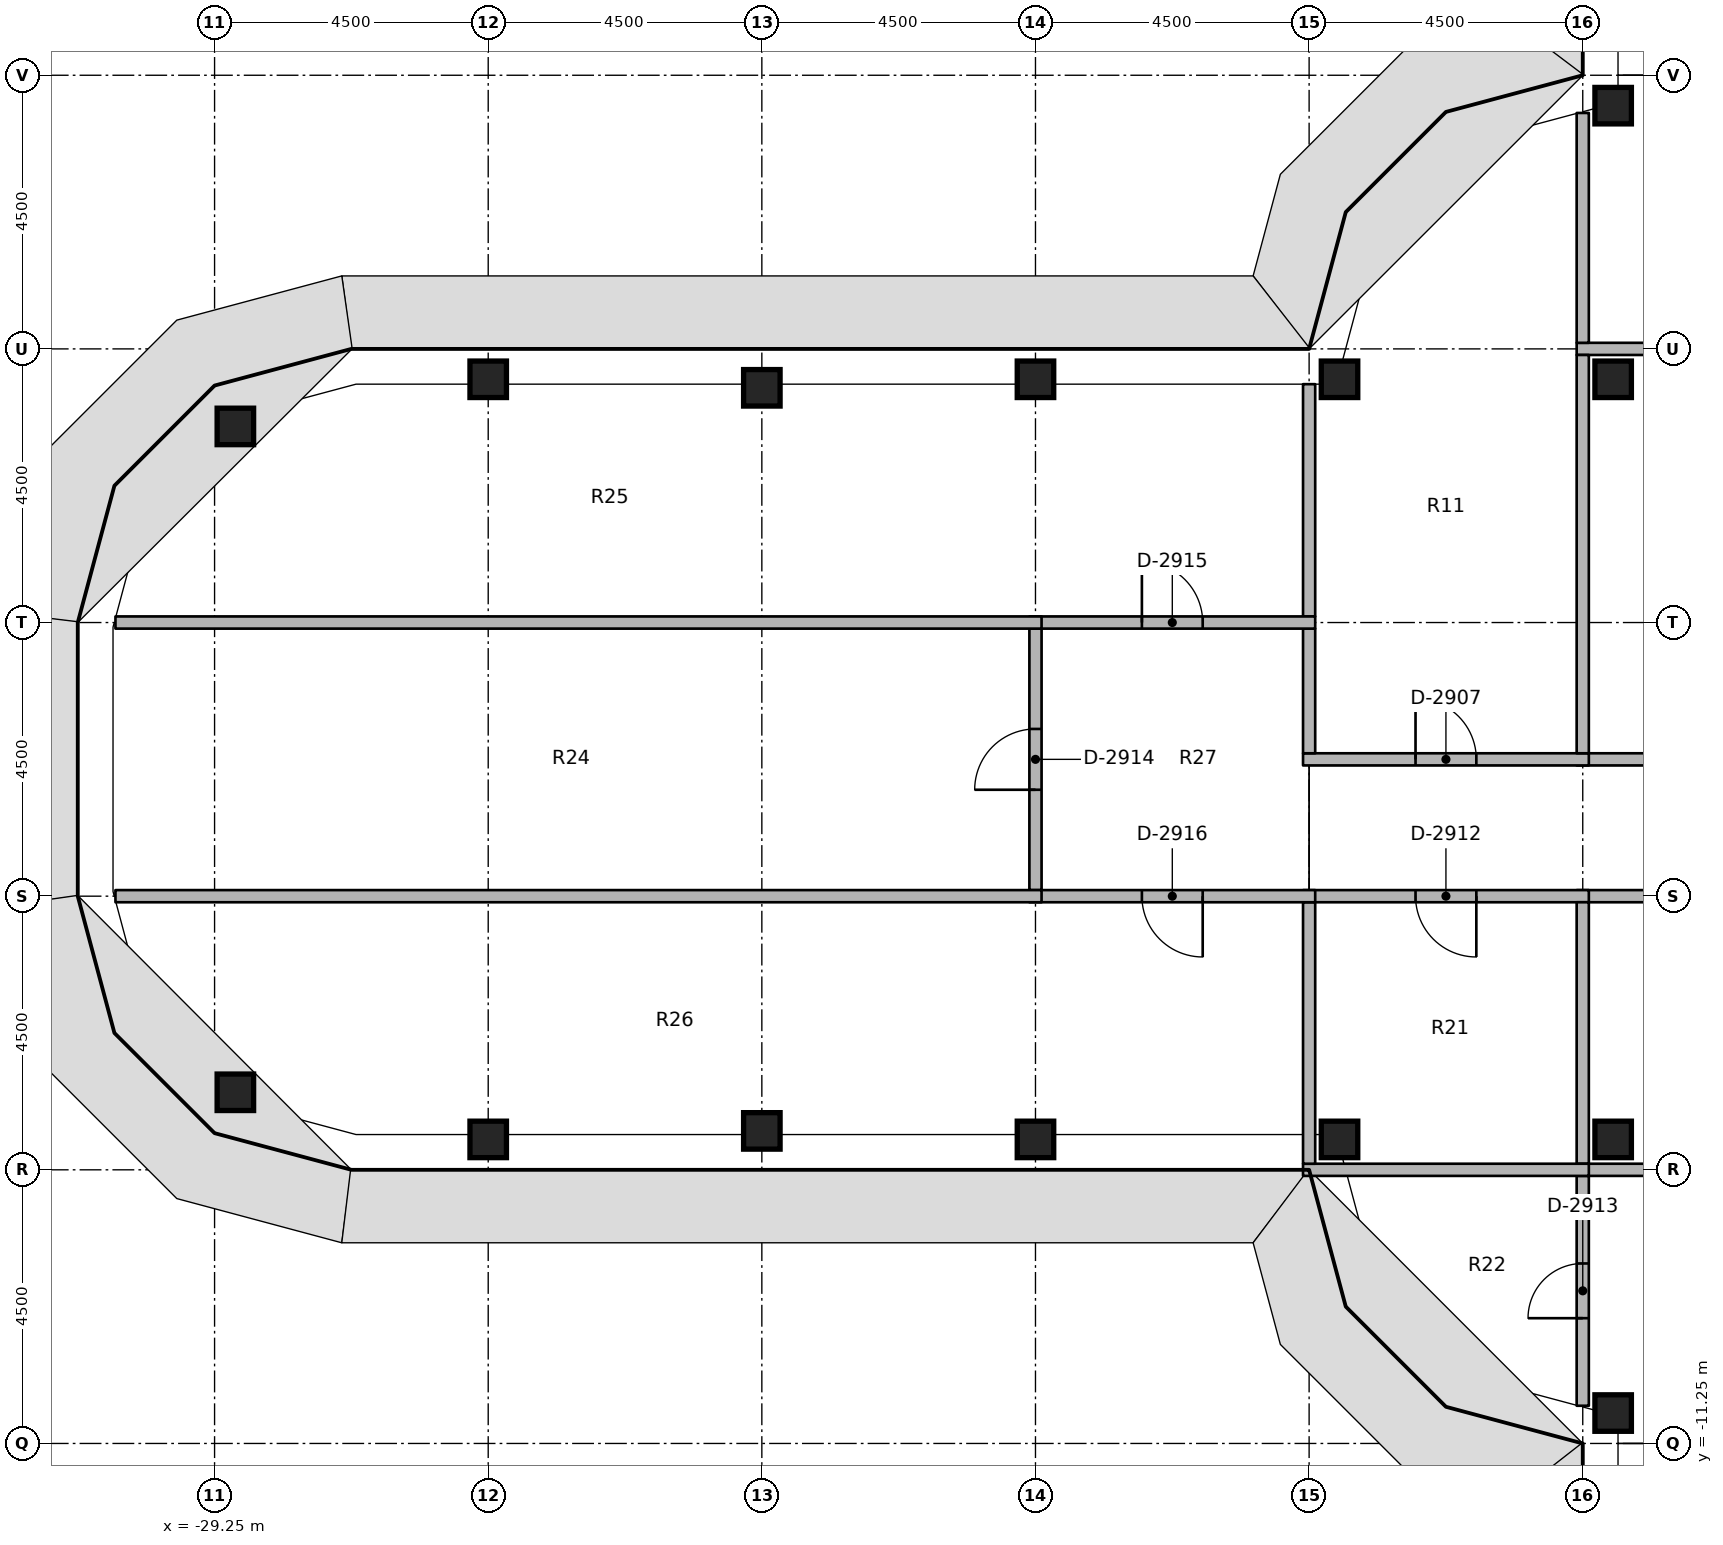
"""IFC4 building model, lengths in metres.
Left out: names, types, materials, properties, quantities, classifications, styles, units other than length and angle.
Written with IfcOpenShell. Run it as: python <this file> out.ifc"""

import sys

from ifc_helpers import new_model, si_unit, direction, frame, frame_2d, origin, origin_2d, place, context, subcontext, project, spatial, rectangle, extrude, element, fill, save


model = new_model("IFC4")
c1 = context("Model", 3, precision=1e-05, world=origin(), true_north=direction((0.0, 1.0)))
c2 = subcontext(c1, "Body", "Model", "MODEL_VIEW")
j1 = project(units=[si_unit("LENGTHUNIT", "METRE"), si_unit("PLANEANGLEUNIT", "RADIAN")], contexts=[c1])
p1 = place(None, origin())
s1 = spatial("IfcSite", under=j1, at=p1, CompositionType="ELEMENT")
p2 = place(p1, origin())
s2 = spatial("IfcBuilding", under=s1, at=p2, CompositionType="ELEMENT")
p3 = place(p2, frame((0.0, 0.0, 276.4)))
s3 = spatial("IfcBuildingStorey", under=s2, at=p3, CompositionType="ELEMENT", Elevation=276.4)
for number, where, z_axis, x_axis in (
    (1, (-28.908, -5.475, 0.0), (0.0, 0.0, 1.0), (1.0, 0.0, 0.0)),
    (2, (-28.908, 5.475, 0.0), (0.0, 0.0, 1.0), (1.0, 0.0, 0.0)),
    (3, (-24.75, -6.25, 0.0), (0.0, 0.0, 1.0), (1.0, 0.0, 0.0)),
    (4, (-24.75, 6.25, 0.0), (0.0, 0.0, 1.0), (1.0, 0.0, 0.0)),
    (5, (-20.25, -6.11, 0.0), (0.0, 0.0, 1.0), (1.0, 0.0, 0.0)),
    (6, (-20.25, 6.11, 0.0), (0.0, 0.0, 1.0), (1.0, 0.0, 0.0)),
    (7, (-15.75, -6.25, 0.0), (0.0, 0.0, 1.0), (1.0, 0.0, 0.0)),
    (8, (-15.75, 6.25, 0.0), (0.0, 0.0, 1.0), (1.0, 0.0, 0.0)),
    (9, (-10.75, -6.25, 0.0), (0.0, 0.0, 1.0), (1.0, 0.0, 0.0)),
    (10, (-10.75, 6.25, 0.0), (0.0, 0.0, 1.0), (1.0, 0.0, 0.0)),
    (11, (-6.25, -10.75, 0.0), (0.0, 0.0, 1.0), (1.0, 0.0, 0.0)),
    (12, (-6.25, -6.25, 0.0), (0.0, 0.0, 1.0), (1.0, 0.0, 0.0)),
    (13, (-6.25, 6.25, 0.0), (0.0, 0.0, 1.0), (1.0, 0.0, 0.0)),
    (14, (-6.25, 10.75, 0.0), (0.0, 0.0, 1.0), (1.0, 0.0, 0.0)),
):
    element("IfcColumn", number, at=place(p3, frame(where, z_axis=z_axis, x_axis=x_axis)), inside=s3, PredefinedType="COLUMN", context=c2, shape_type="SweptSolid", body=[
        extrude(rectangle(XDim=0.6, YDim=0.6, at=origin_2d()), origin(), (0.0, 0.0, 1.0), 3.65),
    ])
p4 = place(p3, frame((-6.85, 0.0, 0.0), z_axis=(0.0, 0.0, 1.0), x_axis=(1.0, 0.0, 0.0)))
e15 = element("IfcWall", 15, at=p4, inside=s3, PredefinedType="PARTITIONING", context=c2, shape_type="SweptSolid", body=[
    extrude(rectangle(XDim=5.825, YDim=0.2, at=frame_2d((2.913, 0.0))), origin(), (0.0, 0.0, 1.0), 2.75),
])
p5 = place(p4, frame((2.413, 0.0, 0.0)))
e16 = element("IfcOpeningElement", 16, at=p5, cuts=e15, PredefinedType="OPENING", context=c2, shape_type="SweptSolid", body=[
    extrude(rectangle(XDim=1.0, YDim=2.1, at=frame_2d((0.5, 1.05))), frame((0.0, 0.11, 0.0), z_axis=(0.0, -1.0, 0.0), x_axis=(1.0, 0.0, 0.0)), (0.0, 0.0, 1.0), 0.22),
])
p6 = place(p3, frame((-11.35, 0.0, 0.0), z_axis=(0.0, 0.0, 1.0), x_axis=(1.0, 0.0, 0.0)))
e17 = element("IfcWall", 17, at=p6, inside=s3, PredefinedType="PARTITIONING", context=c2, shape_type="SweptSolid", body=[
    extrude(rectangle(XDim=4.7, YDim=0.2, at=frame_2d((2.35, 0.0))), origin(), (0.0, 0.0, 1.0), 2.75),
])
p7 = place(p6, frame((1.85, 0.0, 0.0)))
e18 = element("IfcOpeningElement", 18, at=p7, cuts=e17, PredefinedType="OPENING", context=c2, shape_type="SweptSolid", body=[
    extrude(rectangle(XDim=1.0, YDim=2.1, at=frame_2d((0.5, 1.05))), frame((0.0, 0.11, 0.0), z_axis=(0.0, -1.0, 0.0), x_axis=(1.0, 0.0, 0.0)), (0.0, 0.0, 1.0), 0.22),
])
p8 = place(p3, frame((-1.025, -2.25, 0.0), z_axis=(0.0, 0.0, 1.0), x_axis=(-1.0, 0.0, 0.0)))
e19 = element("IfcWall", 19, at=p8, inside=s3, PredefinedType="PARTITIONING", context=c2, shape_type="SweptSolid", body=[
    extrude(rectangle(XDim=5.825, YDim=0.2, at=frame_2d((2.913, 0.0))), origin(), (0.0, 0.0, 1.0), 2.75),
])
p9 = place(p8, frame((2.413, 0.0, 0.0)))
e20 = element("IfcOpeningElement", 20, at=p9, cuts=e19, PredefinedType="OPENING", context=c2, shape_type="SweptSolid", body=[
    extrude(rectangle(XDim=1.0, YDim=2.1, at=frame_2d((0.5, 1.05))), frame((0.0, 0.11, 0.0), z_axis=(0.0, -1.0, 0.0), x_axis=(1.0, 0.0, 0.0)), (0.0, 0.0, 1.0), 0.22),
])
p10 = place(p3, frame((-6.65, -2.25, 0.0), z_axis=(0.0, 0.0, 1.0), x_axis=(-1.0, 0.0, 0.0)))
e21 = element("IfcWall", 21, at=p10, inside=s3, PredefinedType="PARTITIONING", context=c2, shape_type="SweptSolid", body=[
    extrude(rectangle(XDim=4.7, YDim=0.2, at=frame_2d((2.35, 0.0))), origin(), (0.0, 0.0, 1.0), 2.75),
])
p11 = place(p10, frame((1.85, 0.0, 0.0)))
e22 = element("IfcOpeningElement", 22, at=p11, cuts=e21, PredefinedType="OPENING", context=c2, shape_type="SweptSolid", body=[
    extrude(rectangle(XDim=1.0, YDim=2.1, at=frame_2d((0.5, 1.05))), frame((0.0, 0.11, 0.0), z_axis=(0.0, -1.0, 0.0), x_axis=(1.0, 0.0, 0.0)), (0.0, 0.0, 1.0), 0.22),
])
p12 = place(p3, frame((-6.85, 6.75, 0.0), z_axis=(0.0, 0.0, 1.0), x_axis=(1.0, 0.0, 0.0)))
e23 = element("IfcWall", 23, at=p12, inside=s3, PredefinedType="PARTITIONING", context=c2, shape_type="SweptSolid", body=[
    extrude(rectangle(XDim=5.825, YDim=0.2, at=frame_2d((2.913, 0.0))), origin(), (0.0, 0.0, 1.0), 2.75),
])
p13 = place(p3, frame((-6.75, 6.85, 0.0), z_axis=(0.0, 0.0, 1.0), x_axis=(0.0, 1.0, 0.0)))
e24 = element("IfcWall", 24, at=p13, inside=s3, PredefinedType="PARTITIONING", context=c2, shape_type="SweptSolid", body=[
    extrude(rectangle(XDim=3.78, YDim=0.2, at=frame_2d((1.89, 0.0))), origin(), (0.0, 0.0, 1.0), 2.75),
])
p14 = place(p3, frame((-6.85, -6.75, 0.0), z_axis=(0.0, 0.0, 1.0), x_axis=(1.0, 0.0, 0.0)))
e25 = element("IfcWall", 25, at=p14, inside=s3, PredefinedType="PARTITIONING", context=c2, shape_type="SweptSolid", body=[
    extrude(rectangle(XDim=5.825, YDim=0.2, at=frame_2d((2.913, 0.0))), origin(), (0.0, 0.0, 1.0), 2.75),
])
p15 = place(p3, frame((-6.75, -10.63, 0.0), z_axis=(0.0, 0.0, 1.0), x_axis=(0.0, 1.0, 0.0)))
e26 = element("IfcWall", 26, at=p15, inside=s3, PredefinedType="PARTITIONING", context=c2, shape_type="SweptSolid", body=[
    extrude(rectangle(XDim=3.78, YDim=0.2, at=frame_2d((1.89, 0.0))), origin(), (0.0, 0.0, 1.0), 2.75),
])
p16 = place(p15, frame((1.44, 0.0, 0.0)))
e27 = element("IfcOpeningElement", 27, at=p16, cuts=e26, PredefinedType="OPENING", context=c2, shape_type="SweptSolid", body=[
    extrude(rectangle(XDim=0.9, YDim=2.1, at=frame_2d((0.45, 1.05))), frame((0.0, 0.11, 0.0), z_axis=(0.0, -1.0, 0.0), x_axis=(1.0, 0.0, 0.0)), (0.0, 0.0, 1.0), 0.22),
])
p17 = place(p3, frame((-6.75, 0.1, 0.0), z_axis=(0.0, 0.0, 1.0), x_axis=(0.0, 1.0, 0.0)))
e28 = element("IfcWall", 28, at=p17, inside=s3, PredefinedType="PARTITIONING", context=c2, shape_type="SweptSolid", body=[
    extrude(rectangle(XDim=6.55, YDim=0.2, at=frame_2d((3.275, 0.0))), origin(), (0.0, 0.0, 1.0), 2.75),
])
p18 = place(p3, frame((-11.25, 0.1, 0.0), z_axis=(0.0, 0.0, 1.0), x_axis=(0.0, 1.0, 0.0)))
e29 = element("IfcWall", 29, at=p18, inside=s3, PredefinedType="PARTITIONING", context=c2, shape_type="SweptSolid", body=[
    extrude(rectangle(XDim=2.05, YDim=0.2, at=frame_2d((1.025, 0.0))), origin(), (0.0, 0.0, 1.0), 2.75),
])
p19 = place(p3, frame((-11.25, 2.35, 0.0), z_axis=(0.0, 0.0, 1.0), x_axis=(0.0, 1.0, 0.0)))
e30 = element("IfcWall", 30, at=p19, inside=s3, PredefinedType="PARTITIONING", context=c2, shape_type="SweptSolid", body=[
    extrude(rectangle(XDim=3.82, YDim=0.2, at=frame_2d((1.91, 0.0))), origin(), (0.0, 0.0, 1.0), 2.75),
])
p20 = place(p3, frame((-6.75, -6.65, 0.0), z_axis=(0.0, 0.0, 1.0), x_axis=(0.0, 1.0, 0.0)))
e31 = element("IfcWall", 31, at=p20, inside=s3, PredefinedType="PARTITIONING", context=c2, shape_type="SweptSolid", body=[
    extrude(rectangle(XDim=4.3, YDim=0.2, at=frame_2d((2.15, 0.0))), origin(), (0.0, 0.0, 1.0), 2.75),
])
p21 = place(p3, frame((-11.35, -6.75, 0.0), z_axis=(0.0, 0.0, 1.0), x_axis=(1.0, 0.0, 0.0)))
e32 = element("IfcWall", 32, at=p21, inside=s3, PredefinedType="PARTITIONING", context=c2, shape_type="SweptSolid", body=[
    extrude(rectangle(XDim=4.7, YDim=0.2, at=frame_2d((2.35, 0.0))), origin(), (0.0, 0.0, 1.0), 2.75),
])
p22 = place(p3, frame((-11.25, -6.65, 0.0), z_axis=(0.0, 0.0, 1.0), x_axis=(0.0, 1.0, 0.0)))
e33 = element("IfcWall", 33, at=p22, inside=s3, PredefinedType="PARTITIONING", context=c2, shape_type="SweptSolid", body=[
    extrude(rectangle(XDim=4.3, YDim=0.2, at=frame_2d((2.15, 0.0))), origin(), (0.0, 0.0, 1.0), 2.75),
])
p23 = place(p3, frame((-15.85, 2.25, 0.0), z_axis=(0.0, 0.0, 1.0), x_axis=(1.0, 0.0, 0.0)))
e34 = element("IfcWall", 34, at=p23, inside=s3, PredefinedType="PARTITIONING", context=c2, shape_type="SweptSolid", body=[
    extrude(rectangle(XDim=4.7, YDim=0.2, at=frame_2d((2.35, 0.0))), origin(), (0.0, 0.0, 1.0), 2.75),
])
p24 = place(p23, frame((1.85, 0.0, 0.0)))
e35 = element("IfcOpeningElement", 35, at=p24, cuts=e34, PredefinedType="OPENING", context=c2, shape_type="SweptSolid", body=[
    extrude(rectangle(XDim=1.0, YDim=2.1, at=frame_2d((0.5, 1.05))), frame((0.0, 0.11, 0.0), z_axis=(0.0, -1.0, 0.0), x_axis=(1.0, 0.0, 0.0)), (0.0, 0.0, 1.0), 0.22),
])
p25 = place(p3, frame((-11.15, -2.25, 0.0), z_axis=(0.0, 0.0, 1.0), x_axis=(-1.0, 0.0, 0.0)))
e36 = element("IfcWall", 36, at=p25, inside=s3, PredefinedType="PARTITIONING", context=c2, shape_type="SweptSolid", body=[
    extrude(rectangle(XDim=4.7, YDim=0.2, at=frame_2d((2.35, 0.0))), origin(), (0.0, 0.0, 1.0), 2.75),
])
p26 = place(p25, frame((1.85, 0.0, 0.0)))
e37 = element("IfcOpeningElement", 37, at=p26, cuts=e36, PredefinedType="OPENING", context=c2, shape_type="SweptSolid", body=[
    extrude(rectangle(XDim=1.0, YDim=2.1, at=frame_2d((0.5, 1.05))), frame((0.0, 0.11, 0.0), z_axis=(0.0, -1.0, 0.0), x_axis=(1.0, 0.0, 0.0)), (0.0, 0.0, 1.0), 0.22),
])
p27 = place(p3, frame((-15.75, -2.15, 0.0), z_axis=(0.0, 0.0, 1.0), x_axis=(0.0, 1.0, 0.0)))
e38 = element("IfcWall", 38, at=p27, inside=s3, PredefinedType="PARTITIONING", context=c2, shape_type="SweptSolid", body=[
    extrude(rectangle(XDim=4.3, YDim=0.2, at=frame_2d((2.15, 0.0))), origin(), (0.0, 0.0, 1.0), 2.75),
])
p28 = place(p27, frame((1.65, 0.0, 0.0)))
e39 = element("IfcOpeningElement", 39, at=p28, cuts=e38, PredefinedType="OPENING", context=c2, shape_type="SweptSolid", body=[
    extrude(rectangle(XDim=1.0, YDim=2.1, at=frame_2d((0.5, 1.05))), frame((0.0, 0.11, 0.0), z_axis=(0.0, -1.0, 0.0), x_axis=(1.0, 0.0, 0.0)), (0.0, 0.0, 1.0), 0.22),
])
for number, where, z_axis, x_axis in (
    (40, (-30.88, 2.25, 0.0), (0.0, 0.0, 1.0), (1.0, 0.0, 0.0)),
    (41, (-30.88, -2.25, 0.0), (0.0, 0.0, 1.0), (1.0, 0.0, 0.0)),
):
    element("IfcWall", number, at=place(p3, frame(where, z_axis=z_axis, x_axis=x_axis)), inside=s3, PredefinedType="PARTITIONING", context=c2, shape_type="SweptSolid", body=[
        extrude(rectangle(XDim=15.23, YDim=0.2, at=frame_2d((7.615, 0.0))), origin(), (0.0, 0.0, 1.0), 2.75),
    ])
p29 = place(p7, origin())
e42 = element("IfcDoor", 42, at=p29, inside=s3, OperationType="SINGLE_SWING_RIGHT", PredefinedType="DOOR", context=c2, shape_type="SweptSolid", body=[
    extrude(rectangle(XDim=1.0, YDim=2.1, at=frame_2d((0.5, 1.05))), frame((0.0, 0.025, 0.0), z_axis=(0.0, -1.0, 0.0), x_axis=(1.0, 0.0, 0.0)), (0.0, 0.0, 1.0), 0.05),
])
fill(e18, e42)
p30 = place(p11, origin())
e43 = element("IfcDoor", 43, at=p30, inside=s3, OperationType="SINGLE_SWING_RIGHT", PredefinedType="DOOR", context=c2, shape_type="SweptSolid", body=[
    extrude(rectangle(XDim=1.0, YDim=2.1, at=frame_2d((0.5, 1.05))), frame((0.0, 0.025, 0.0), z_axis=(0.0, -1.0, 0.0), x_axis=(1.0, 0.0, 0.0)), (0.0, 0.0, 1.0), 0.05),
])
fill(e22, e43)
p31 = place(p16, origin())
e44 = element("IfcDoor", 44, at=p31, inside=s3, OperationType="SINGLE_SWING_RIGHT", PredefinedType="DOOR", context=c2, shape_type="SweptSolid", body=[
    extrude(rectangle(XDim=0.9, YDim=2.1, at=frame_2d((0.45, 1.05))), frame((0.0, 0.025, 0.0), z_axis=(0.0, -1.0, 0.0), x_axis=(1.0, 0.0, 0.0)), (0.0, 0.0, 1.0), 0.05),
])
fill(e27, e44)
p32 = place(p28, origin())
e45 = element("IfcDoor", 45, at=p32, inside=s3, OperationType="SINGLE_SWING_RIGHT", PredefinedType="DOOR", context=c2, shape_type="SweptSolid", body=[
    extrude(rectangle(XDim=1.0, YDim=2.1, at=frame_2d((0.5, 1.05))), frame((0.0, 0.025, 0.0), z_axis=(0.0, -1.0, 0.0), x_axis=(1.0, 0.0, 0.0)), (0.0, 0.0, 1.0), 0.05),
])
fill(e39, e45)
p33 = place(p24, origin())
e46 = element("IfcDoor", 46, at=p33, inside=s3, OperationType="SINGLE_SWING_RIGHT", PredefinedType="DOOR", context=c2, shape_type="SweptSolid", body=[
    extrude(rectangle(XDim=1.0, YDim=2.1, at=frame_2d((0.5, 1.05))), frame((0.0, 0.025, 0.0), z_axis=(0.0, -1.0, 0.0), x_axis=(1.0, 0.0, 0.0)), (0.0, 0.0, 1.0), 0.05),
])
fill(e35, e46)
p34 = place(p26, origin())
e47 = element("IfcDoor", 47, at=p34, inside=s3, OperationType="SINGLE_SWING_RIGHT", PredefinedType="DOOR", context=c2, shape_type="SweptSolid", body=[
    extrude(rectangle(XDim=1.0, YDim=2.1, at=frame_2d((0.5, 1.05))), frame((0.0, 0.025, 0.0), z_axis=(0.0, -1.0, 0.0), x_axis=(1.0, 0.0, 0.0)), (0.0, 0.0, 1.0), 0.05),
])
fill(e37, e47)
save(model, sys.argv[1])
